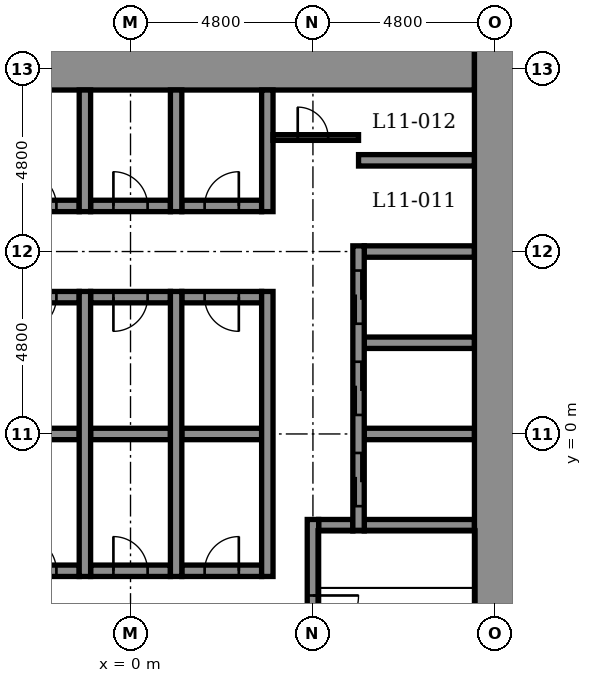
"""IFC4 building model, lengths in metres.
Left out: names, types, materials, properties, quantities, classifications, styles, units other than length and angle.
Written with IfcOpenShell. Run it as: python <this file> out.ifc"""

import sys

from ifc_helpers import new_model, si_unit, direction, frame, frame_2d, origin, place, context, subcontext, project, spatial, rectangle, extrude, element, fill, save


model = new_model("IFC4")
c1 = context("Model", 3, precision=1e-05, world=origin(), true_north=direction((0.0, 1.0)))
c2 = subcontext(c1, "Body", "Model", "MODEL_VIEW")
j1 = project(units=[si_unit("LENGTHUNIT", "METRE"), si_unit("PLANEANGLEUNIT", "RADIAN")], contexts=[c1])
p1 = place(None, origin())
s1 = spatial("IfcSite", under=j1, at=p1, CompositionType="ELEMENT")
p2 = place(p1, origin())
s2 = spatial("IfcBuilding", under=s1, at=p2, CompositionType="ELEMENT")
p3 = place(p2, frame((0.0, 0.0, 60.9)))
s3 = spatial("IfcBuildingStorey", under=s2, at=p3, CompositionType="ELEMENT", Elevation=60.9)
p4 = place(p3, frame((-3.45, -3.6, -0.25), z_axis=(0.0, 0.0, 1.0), x_axis=(1.0, 0.0, 0.0)))
e1 = element("IfcWall", 1, at=p4, inside=s3, PredefinedType="STANDARD", context=c2, shape_type="SweptSolid", body=[
    extrude(rectangle(XDim=2.1, YDim=0.3, at=frame_2d((1.05, 0.0))), origin(), (0.0, 0.0, 1.0), 5.45),
])
p5 = place(p4, frame((0.6, 0.0, 0.25)))
e2 = element("IfcOpeningElement", 2, at=p5, cuts=e1, PredefinedType="OPENING", context=c2, shape_type="SweptSolid", body=[
    extrude(rectangle(XDim=0.9, YDim=2.1, at=frame_2d((0.45, 1.05))), frame((0.0, 0.16, 0.0), z_axis=(0.0, -1.0, 0.0), x_axis=(1.0, 0.0, 0.0)), (0.0, 0.0, 1.0), 0.32),
])
p6 = place(p3, frame((-1.05, -3.6, -0.25), z_axis=(0.0, 0.0, 1.0), x_axis=(1.0, 0.0, 0.0)))
e3 = element("IfcWall", 3, at=p6, inside=s3, PredefinedType="STANDARD", context=c2, shape_type="SweptSolid", body=[
    extrude(rectangle(XDim=2.1, YDim=0.3, at=frame_2d((1.05, 0.0))), origin(), (0.0, 0.0, 1.0), 5.45),
])
p7 = place(p6, frame((0.6, 0.0, 0.25)))
e4 = element("IfcOpeningElement", 4, at=p7, cuts=e3, PredefinedType="OPENING", context=c2, shape_type="SweptSolid", body=[
    extrude(rectangle(XDim=0.9, YDim=2.1, at=frame_2d((0.45, 1.05))), frame((0.0, 0.16, 0.0), z_axis=(0.0, -1.0, 0.0), x_axis=(1.0, 0.0, 0.0)), (0.0, 0.0, 1.0), 0.32),
])
p8 = place(p3, frame((1.35, -3.6, -0.25), z_axis=(0.0, 0.0, 1.0), x_axis=(1.0, 0.0, 0.0)))
e5 = element("IfcWall", 5, at=p8, inside=s3, PredefinedType="STANDARD", context=c2, shape_type="SweptSolid", body=[
    extrude(rectangle(XDim=2.1, YDim=0.3, at=frame_2d((1.05, 0.0))), origin(), (0.0, 0.0, 1.0), 5.45),
])
p9 = place(p8, frame((0.6, 0.0, 0.25)))
e6 = element("IfcOpeningElement", 6, at=p9, cuts=e5, PredefinedType="OPENING", context=c2, shape_type="SweptSolid", body=[
    extrude(rectangle(XDim=0.9, YDim=2.1, at=frame_2d((0.45, 1.05))), frame((0.0, 0.16, 0.0), z_axis=(0.0, -1.0, 0.0), x_axis=(1.0, 0.0, 0.0)), (0.0, 0.0, 1.0), 0.32),
])
p10 = place(p3, frame((4.95, -2.4, -0.25), z_axis=(0.0, 0.0, 1.0), x_axis=(1.0, 0.0, 0.0)))
e7 = element("IfcWall", 7, at=p10, inside=s3, PredefinedType="STANDARD", context=c2, shape_type="SweptSolid", body=[
    extrude(rectangle(XDim=0.9, YDim=0.3, at=frame_2d((0.45, 0.0))), origin(), (0.0, 0.0, 1.0), 5.45),
])
p11 = place(p3, frame((6.15, -2.4, -0.25), z_axis=(0.0, 0.0, 1.0), x_axis=(1.0, 0.0, 0.0)))
e8 = element("IfcWall", 8, at=p11, inside=s3, PredefinedType="STANDARD", context=c2, shape_type="SweptSolid", body=[
    extrude(rectangle(XDim=2.9, YDim=0.3, at=frame_2d((1.45, 0.0))), origin(), (0.0, 0.0, 1.0), 5.45),
])
p12 = place(p3, frame((-3.45, 0.0, -0.25), z_axis=(0.0, 0.0, 1.0), x_axis=(1.0, 0.0, 0.0)))
e9 = element("IfcWall", 9, at=p12, inside=s3, PredefinedType="STANDARD", context=c2, shape_type="SweptSolid", body=[
    extrude(rectangle(XDim=2.1, YDim=0.3, at=frame_2d((1.05, 0.0))), origin(), (0.0, 0.0, 1.0), 5.45),
])
p13 = place(p3, frame((-1.05, 0.0, -0.25), z_axis=(0.0, 0.0, 1.0), x_axis=(1.0, 0.0, 0.0)))
e10 = element("IfcWall", 10, at=p13, inside=s3, PredefinedType="STANDARD", context=c2, shape_type="SweptSolid", body=[
    extrude(rectangle(XDim=2.1, YDim=0.3, at=frame_2d((1.05, 0.0))), origin(), (0.0, 0.0, 1.0), 5.45),
])
p14 = place(p3, frame((1.35, 0.0, -0.25), z_axis=(0.0, 0.0, 1.0), x_axis=(1.0, 0.0, 0.0)))
e11 = element("IfcWall", 11, at=p14, inside=s3, PredefinedType="STANDARD", context=c2, shape_type="SweptSolid", body=[
    extrude(rectangle(XDim=2.1, YDim=0.3, at=frame_2d((1.05, 0.0))), origin(), (0.0, 0.0, 1.0), 5.45),
])
for number, where, z_axis, x_axis in (
    (12, (6.15, 0.0, -0.25), (0.0, 0.0, 1.0), (1.0, 0.0, 0.0)),
    (13, (6.15, 2.4, -0.25), (0.0, 0.0, 1.0), (1.0, 0.0, 0.0)),
):
    element("IfcWall", number, at=place(p3, frame(where, z_axis=z_axis, x_axis=x_axis)), inside=s3, PredefinedType="STANDARD", context=c2, shape_type="SweptSolid", body=[
        extrude(rectangle(XDim=2.9, YDim=0.3, at=frame_2d((1.45, 0.0))), origin(), (0.0, 0.0, 1.0), 5.45),
    ])
p15 = place(p3, frame((-3.45, 3.6, -0.25), z_axis=(0.0, 0.0, 1.0), x_axis=(1.0, 0.0, 0.0)))
e14 = element("IfcWall", 14, at=p15, inside=s3, PredefinedType="STANDARD", context=c2, shape_type="SweptSolid", body=[
    extrude(rectangle(XDim=2.1, YDim=0.3, at=frame_2d((1.05, 0.0))), origin(), (0.0, 0.0, 1.0), 5.45),
])
p16 = place(p15, frame((0.6, 0.0, 0.25)))
e15 = element("IfcOpeningElement", 15, at=p16, cuts=e14, PredefinedType="OPENING", context=c2, shape_type="SweptSolid", body=[
    extrude(rectangle(XDim=0.9, YDim=2.1, at=frame_2d((0.45, 1.05))), frame((0.0, 0.16, 0.0), z_axis=(0.0, -1.0, 0.0), x_axis=(1.0, 0.0, 0.0)), (0.0, 0.0, 1.0), 0.32),
])
p17 = place(p3, frame((-1.05, 3.6, -0.25), z_axis=(0.0, 0.0, 1.0), x_axis=(1.0, 0.0, 0.0)))
e16 = element("IfcWall", 16, at=p17, inside=s3, PredefinedType="STANDARD", context=c2, shape_type="SweptSolid", body=[
    extrude(rectangle(XDim=2.1, YDim=0.3, at=frame_2d((1.05, 0.0))), origin(), (0.0, 0.0, 1.0), 5.45),
])
p18 = place(p17, frame((0.6, 0.0, 0.25)))
e17 = element("IfcOpeningElement", 17, at=p18, cuts=e16, PredefinedType="OPENING", context=c2, shape_type="SweptSolid", body=[
    extrude(rectangle(XDim=0.9, YDim=2.1, at=frame_2d((0.45, 1.05))), frame((0.0, 0.16, 0.0), z_axis=(0.0, -1.0, 0.0), x_axis=(1.0, 0.0, 0.0)), (0.0, 0.0, 1.0), 0.32),
])
p19 = place(p3, frame((1.35, 3.6, -0.25), z_axis=(0.0, 0.0, 1.0), x_axis=(1.0, 0.0, 0.0)))
e18 = element("IfcWall", 18, at=p19, inside=s3, PredefinedType="STANDARD", context=c2, shape_type="SweptSolid", body=[
    extrude(rectangle(XDim=2.1, YDim=0.3, at=frame_2d((1.05, 0.0))), origin(), (0.0, 0.0, 1.0), 5.45),
])
p20 = place(p19, frame((0.6, 0.0, 0.25)))
e19 = element("IfcOpeningElement", 19, at=p20, cuts=e18, PredefinedType="OPENING", context=c2, shape_type="SweptSolid", body=[
    extrude(rectangle(XDim=0.9, YDim=2.1, at=frame_2d((0.45, 1.05))), frame((0.0, 0.16, 0.0), z_axis=(0.0, -1.0, 0.0), x_axis=(1.0, 0.0, 0.0)), (0.0, 0.0, 1.0), 0.32),
])
p21 = place(p3, frame((6.15, 4.8, -0.25), z_axis=(0.0, 0.0, 1.0), x_axis=(1.0, 0.0, 0.0)))
e20 = element("IfcWall", 20, at=p21, inside=s3, PredefinedType="STANDARD", context=c2, shape_type="SweptSolid", body=[
    extrude(rectangle(XDim=2.9, YDim=0.3, at=frame_2d((1.45, 0.0))), origin(), (0.0, 0.0, 1.0), 5.45),
])
p22 = place(p3, frame((-3.45, 6.0, -0.25), z_axis=(0.0, 0.0, 1.0), x_axis=(1.0, 0.0, 0.0)))
e21 = element("IfcWall", 21, at=p22, inside=s3, PredefinedType="STANDARD", context=c2, shape_type="SweptSolid", body=[
    extrude(rectangle(XDim=2.1, YDim=0.3, at=frame_2d((1.05, 0.0))), origin(), (0.0, 0.0, 1.0), 5.45),
])
p23 = place(p22, frame((0.6, 0.0, 0.25)))
e22 = element("IfcOpeningElement", 22, at=p23, cuts=e21, PredefinedType="OPENING", context=c2, shape_type="SweptSolid", body=[
    extrude(rectangle(XDim=0.9, YDim=2.1, at=frame_2d((0.45, 1.05))), frame((0.0, 0.16, 0.0), z_axis=(0.0, -1.0, 0.0), x_axis=(1.0, 0.0, 0.0)), (0.0, 0.0, 1.0), 0.32),
])
p24 = place(p3, frame((-1.05, 6.0, -0.25), z_axis=(0.0, 0.0, 1.0), x_axis=(1.0, 0.0, 0.0)))
e23 = element("IfcWall", 23, at=p24, inside=s3, PredefinedType="STANDARD", context=c2, shape_type="SweptSolid", body=[
    extrude(rectangle(XDim=2.1, YDim=0.3, at=frame_2d((1.05, 0.0))), origin(), (0.0, 0.0, 1.0), 5.45),
])
p25 = place(p24, frame((0.6, 0.0, 0.25)))
e24 = element("IfcOpeningElement", 24, at=p25, cuts=e23, PredefinedType="OPENING", context=c2, shape_type="SweptSolid", body=[
    extrude(rectangle(XDim=0.9, YDim=2.1, at=frame_2d((0.45, 1.05))), frame((0.0, 0.16, 0.0), z_axis=(0.0, -1.0, 0.0), x_axis=(1.0, 0.0, 0.0)), (0.0, 0.0, 1.0), 0.32),
])
p26 = place(p3, frame((1.35, 6.0, -0.25), z_axis=(0.0, 0.0, 1.0), x_axis=(1.0, 0.0, 0.0)))
e25 = element("IfcWall", 25, at=p26, inside=s3, PredefinedType="STANDARD", context=c2, shape_type="SweptSolid", body=[
    extrude(rectangle(XDim=2.1, YDim=0.3, at=frame_2d((1.05, 0.0))), origin(), (0.0, 0.0, 1.0), 5.45),
])
p27 = place(p26, frame((0.6, 0.0, 0.25)))
e26 = element("IfcOpeningElement", 26, at=p27, cuts=e25, PredefinedType="OPENING", context=c2, shape_type="SweptSolid", body=[
    extrude(rectangle(XDim=0.9, YDim=2.1, at=frame_2d((0.45, 1.05))), frame((0.0, 0.16, 0.0), z_axis=(0.0, -1.0, 0.0), x_axis=(1.0, 0.0, 0.0)), (0.0, 0.0, 1.0), 0.32),
])
p28 = place(p3, frame((6.0, 7.2, -0.25), z_axis=(0.0, 0.0, 1.0), x_axis=(1.0, 0.0, 0.0)))
e27 = element("IfcWall", 27, at=p28, inside=s3, PredefinedType="STANDARD", context=c2, shape_type="SweptSolid", body=[
    extrude(rectangle(XDim=3.05, YDim=0.3, at=frame_2d((1.525, 0.0))), origin(), (0.0, 0.0, 1.0), 5.45),
])
p29 = place(p3, frame((-5.25, 9.6, -0.25), z_axis=(0.0, 0.0, 1.0), x_axis=(1.0, 0.0, 0.0)))
e28 = element("IfcWall", 28, at=p29, inside=s3, PredefinedType="SHEAR", context=c2, shape_type="SweptSolid", body=[
    extrude(rectangle(XDim=14.3, YDim=1.1, at=frame_2d((7.15, 0.0))), origin(), (0.0, 0.0, 1.0), 5.45),
])
p30 = place(p29, frame((0.6, 0.0, 0.25)))
e29 = element("IfcOpeningElement", 29, at=p30, cuts=e28, PredefinedType="OPENING", context=c2, shape_type="SweptSolid", body=[
    extrude(rectangle(XDim=0.9, YDim=2.1, at=frame_2d((0.45, 1.05))), frame((0.0, 0.56, 0.0), z_axis=(0.0, -1.0, 0.0), x_axis=(1.0, 0.0, 0.0)), (0.0, 0.0, 1.0), 1.12),
])
p31 = place(p3, frame((-1.2, -3.75, -0.25), z_axis=(0.0, 0.0, 1.0), x_axis=(0.0, 1.0, 0.0)))
e30 = element("IfcWall", 30, at=p31, inside=s3, PredefinedType="STANDARD", context=c2, shape_type="SweptSolid", body=[
    extrude(rectangle(XDim=7.5, YDim=0.3, at=frame_2d((3.75, 0.0))), origin(), (0.0, 0.0, 1.0), 5.45),
])
p32 = place(p3, frame((-1.2, 5.85, -0.25), z_axis=(0.0, 0.0, 1.0), x_axis=(0.0, 1.0, 0.0)))
e31 = element("IfcWall", 31, at=p32, inside=s3, PredefinedType="STANDARD", context=c2, shape_type="SweptSolid", body=[
    extrude(rectangle(XDim=3.2, YDim=0.3, at=frame_2d((1.6, 0.0))), origin(), (0.0, 0.0, 1.0), 5.45),
])
p33 = place(p3, frame((1.2, -3.75, -0.25), z_axis=(0.0, 0.0, 1.0), x_axis=(0.0, 1.0, 0.0)))
e32 = element("IfcWall", 32, at=p33, inside=s3, PredefinedType="STANDARD", context=c2, shape_type="SweptSolid", body=[
    extrude(rectangle(XDim=7.5, YDim=0.3, at=frame_2d((3.75, 0.0))), origin(), (0.0, 0.0, 1.0), 5.45),
])
p34 = place(p3, frame((1.2, 5.85, -0.25), z_axis=(0.0, 0.0, 1.0), x_axis=(0.0, 1.0, 0.0)))
e33 = element("IfcWall", 33, at=p34, inside=s3, PredefinedType="STANDARD", context=c2, shape_type="SweptSolid", body=[
    extrude(rectangle(XDim=3.2, YDim=0.3, at=frame_2d((1.6, 0.0))), origin(), (0.0, 0.0, 1.0), 5.45),
])
p35 = place(p3, frame((3.6, -3.75, -0.25), z_axis=(0.0, 0.0, 1.0), x_axis=(0.0, 1.0, 0.0)))
e34 = element("IfcWall", 34, at=p35, inside=s3, PredefinedType="STANDARD", context=c2, shape_type="SweptSolid", body=[
    extrude(rectangle(XDim=7.5, YDim=0.3, at=frame_2d((3.75, 0.0))), origin(), (0.0, 0.0, 1.0), 5.45),
])
p36 = place(p3, frame((3.6, 5.85, -0.25), z_axis=(0.0, 0.0, 1.0), x_axis=(0.0, 1.0, 0.0)))
e35 = element("IfcWall", 35, at=p36, inside=s3, PredefinedType="STANDARD", context=c2, shape_type="SweptSolid", body=[
    extrude(rectangle(XDim=3.2, YDim=0.3, at=frame_2d((1.6, 0.0))), origin(), (0.0, 0.0, 1.0), 5.45),
])
p37 = place(p3, frame((4.8, -9.05, -0.25), z_axis=(0.0, 0.0, 1.0), x_axis=(0.0, 1.0, 0.0)))
e36 = element("IfcWall", 36, at=p37, inside=s3, PredefinedType="STANDARD", context=c2, shape_type="SweptSolid", body=[
    extrude(rectangle(XDim=6.8, YDim=0.3, at=frame_2d((3.4, 0.0))), origin(), (0.0, 0.0, 1.0), 5.45),
])
p38 = place(p37, frame((3.6, 0.0, 0.25)))
e37 = element("IfcOpeningElement", 37, at=p38, cuts=e36, PredefinedType="OPENING", context=c2, shape_type="SweptSolid", body=[
    extrude(rectangle(XDim=1.2, YDim=2.1, at=frame_2d((0.6, 1.05))), frame((0.0, 0.16, 0.0), z_axis=(0.0, -1.0, 0.0), x_axis=(1.0, 0.0, 0.0)), (0.0, 0.0, 1.0), 0.32),
])
p39 = place(p3, frame((6.0, -2.55, -0.25), z_axis=(0.0, 0.0, 1.0), x_axis=(0.0, 1.0, 0.0)))
e38 = element("IfcWall", 38, at=p39, inside=s3, PredefinedType="STANDARD", context=c2, shape_type="SweptSolid", body=[
    extrude(rectangle(XDim=7.5, YDim=0.3, at=frame_2d((3.75, 0.0))), origin(), (0.0, 0.0, 1.0), 5.45),
])
p40 = place(p39, frame((0.65, 0.0, 0.25)))
e39 = element("IfcOpeningElement", 39, at=p40, cuts=e38, PredefinedType="OPENING", context=c2, shape_type="SweptSolid", body=[
    extrude(rectangle(XDim=1.4, YDim=2.1, at=frame_2d((0.7, 1.05))), frame((0.0, 0.16, 0.0), z_axis=(0.0, -1.0, 0.0), x_axis=(1.0, 0.0, 0.0)), (0.0, 0.0, 1.0), 0.32),
])
p41 = place(p39, frame((3.05, 0.0, 0.25)))
e40 = element("IfcOpeningElement", 40, at=p41, cuts=e38, PredefinedType="OPENING", context=c2, shape_type="SweptSolid", body=[
    extrude(rectangle(XDim=1.4, YDim=2.1, at=frame_2d((0.7, 1.05))), frame((0.0, 0.16, 0.0), z_axis=(0.0, -1.0, 0.0), x_axis=(1.0, 0.0, 0.0)), (0.0, 0.0, 1.0), 0.32),
])
p42 = place(p39, frame((5.45, 0.0, 0.25)))
e41 = element("IfcOpeningElement", 41, at=p42, cuts=e38, PredefinedType="OPENING", context=c2, shape_type="SweptSolid", body=[
    extrude(rectangle(XDim=1.4, YDim=2.1, at=frame_2d((0.7, 1.05))), frame((0.0, 0.16, 0.0), z_axis=(0.0, -1.0, 0.0), x_axis=(1.0, 0.0, 0.0)), (0.0, 0.0, 1.0), 0.32),
])
p43 = place(p3, frame((9.6, -10.15, -0.25), z_axis=(0.0, 0.0, 1.0), x_axis=(0.0, 1.0, 0.0)))
e42 = element("IfcWall", 42, at=p43, inside=s3, PredefinedType="SHEAR", context=c2, shape_type="SweptSolid", body=[
    extrude(rectangle(XDim=20.3, YDim=1.1, at=frame_2d((10.15, 0.0))), origin(), (0.0, 0.0, 1.0), 5.45),
])
p44 = place(p3, frame((3.75, 7.8, 0.0), z_axis=(0.0, 0.0, 1.0), x_axis=(1.0, 0.0, 0.0)))
e43 = element("IfcWall", 43, at=p44, inside=s3, PredefinedType="PARTITIONING", context=c2, shape_type="SweptSolid", body=[
    extrude(rectangle(XDim=2.25, YDim=0.15, at=frame_2d((1.125, 0.0))), origin(), (0.0, 0.0, 1.0), 5.2),
])
p45 = place(p44, frame((0.65, 0.0, 0.0)))
e44 = element("IfcOpeningElement", 44, at=p45, cuts=e43, PredefinedType="OPENING", context=c2, shape_type="SweptSolid", body=[
    extrude(rectangle(XDim=0.8, YDim=2.1, at=frame_2d((0.4, 1.05))), frame((0.0, 0.085, 0.0), z_axis=(0.0, -1.0, 0.0), x_axis=(1.0, 0.0, 0.0)), (0.0, 0.0, 1.0), 0.17),
])
p46 = place(p45, origin())
e45 = element("IfcDoor", 45, at=p46, inside=s3, OperationType="SINGLE_SWING_LEFT", PredefinedType="DOOR", context=c2, shape_type="SweptSolid", body=[
    extrude(rectangle(XDim=0.8, YDim=2.1, at=frame_2d((0.4, 1.05))), frame((0.0, 0.025, 0.0), z_axis=(0.0, -1.0, 0.0), x_axis=(1.0, 0.0, 0.0)), (0.0, 0.0, 1.0), 0.05),
])
fill(e44, e45)
p47 = place(p40, origin())
e46 = element("IfcDoor", 46, at=p47, inside=s3, OperationType="DOUBLE_DOOR_SLIDING", PredefinedType="DOOR", context=c2, shape_type="SweptSolid", body=[
    extrude(rectangle(XDim=1.4, YDim=2.1, at=frame_2d((0.7, 1.05))), frame((0.0, 0.025, 0.0), z_axis=(0.0, -1.0, 0.0), x_axis=(1.0, 0.0, 0.0)), (0.0, 0.0, 1.0), 0.05),
])
fill(e39, e46)
p48 = place(p41, origin())
e47 = element("IfcDoor", 47, at=p48, inside=s3, OperationType="DOUBLE_DOOR_SLIDING", PredefinedType="DOOR", context=c2, shape_type="SweptSolid", body=[
    extrude(rectangle(XDim=1.4, YDim=2.1, at=frame_2d((0.7, 1.05))), frame((0.0, 0.025, 0.0), z_axis=(0.0, -1.0, 0.0), x_axis=(1.0, 0.0, 0.0)), (0.0, 0.0, 1.0), 0.05),
])
fill(e40, e47)
p49 = place(p42, origin())
e48 = element("IfcDoor", 48, at=p49, inside=s3, OperationType="DOUBLE_DOOR_SLIDING", PredefinedType="DOOR", context=c2, shape_type="SweptSolid", body=[
    extrude(rectangle(XDim=1.4, YDim=2.1, at=frame_2d((0.7, 1.05))), frame((0.0, 0.025, 0.0), z_axis=(0.0, -1.0, 0.0), x_axis=(1.0, 0.0, 0.0)), (0.0, 0.0, 1.0), 0.05),
])
fill(e41, e48)
p50 = place(p38, frame((1.2, 0.0, 0.0), z_axis=(0.0, 0.0, 1.0), x_axis=(-1.0, 0.0, 0.0)))
e49 = element("IfcDoor", 49, at=p50, inside=s3, OperationType="SINGLE_SWING_RIGHT", PredefinedType="DOOR", context=c2, shape_type="SweptSolid", body=[
    extrude(rectangle(XDim=1.2, YDim=2.1, at=frame_2d((0.6, 1.05))), frame((0.0, 0.025, 0.0), z_axis=(0.0, -1.0, 0.0), x_axis=(1.0, 0.0, 0.0)), (0.0, 0.0, 1.0), 0.05),
])
fill(e37, e49)
p51 = place(p23, origin())
e50 = element("IfcDoor", 50, at=p51, inside=s3, OperationType="SINGLE_SWING_LEFT", PredefinedType="DOOR", context=c2, shape_type="SweptSolid", body=[
    extrude(rectangle(XDim=0.9, YDim=2.1, at=frame_2d((0.45, 1.05))), frame((0.0, 0.025, 0.0), z_axis=(0.0, -1.0, 0.0), x_axis=(1.0, 0.0, 0.0)), (0.0, 0.0, 1.0), 0.05),
])
fill(e22, e50)
p52 = place(p25, origin())
e51 = element("IfcDoor", 51, at=p52, inside=s3, OperationType="SINGLE_SWING_LEFT", PredefinedType="DOOR", context=c2, shape_type="SweptSolid", body=[
    extrude(rectangle(XDim=0.9, YDim=2.1, at=frame_2d((0.45, 1.05))), frame((0.0, 0.025, 0.0), z_axis=(0.0, -1.0, 0.0), x_axis=(1.0, 0.0, 0.0)), (0.0, 0.0, 1.0), 0.05),
])
fill(e24, e51)
p53 = place(p27, origin())
e52 = element("IfcDoor", 52, at=p53, inside=s3, OperationType="SINGLE_SWING_RIGHT", PredefinedType="DOOR", context=c2, shape_type="SweptSolid", body=[
    extrude(rectangle(XDim=0.9, YDim=2.1, at=frame_2d((0.45, 1.05))), frame((0.0, 0.025, 0.0), z_axis=(0.0, -1.0, 0.0), x_axis=(1.0, 0.0, 0.0)), (0.0, 0.0, 1.0), 0.05),
])
fill(e26, e52)
p54 = place(p16, frame((0.9, 0.0, 0.0), z_axis=(0.0, 0.0, 1.0), x_axis=(-1.0, 0.0, 0.0)))
e53 = element("IfcDoor", 53, at=p54, inside=s3, OperationType="SINGLE_SWING_LEFT", PredefinedType="DOOR", context=c2, shape_type="SweptSolid", body=[
    extrude(rectangle(XDim=0.9, YDim=2.1, at=frame_2d((0.45, 1.05))), frame((0.0, 0.025, 0.0), z_axis=(0.0, -1.0, 0.0), x_axis=(1.0, 0.0, 0.0)), (0.0, 0.0, 1.0), 0.05),
])
fill(e15, e53)
p55 = place(p18, frame((0.9, 0.0, 0.0), z_axis=(0.0, 0.0, 1.0), x_axis=(-1.0, 0.0, 0.0)))
e54 = element("IfcDoor", 54, at=p55, inside=s3, OperationType="SINGLE_SWING_LEFT", PredefinedType="DOOR", context=c2, shape_type="SweptSolid", body=[
    extrude(rectangle(XDim=0.9, YDim=2.1, at=frame_2d((0.45, 1.05))), frame((0.0, 0.025, 0.0), z_axis=(0.0, -1.0, 0.0), x_axis=(1.0, 0.0, 0.0)), (0.0, 0.0, 1.0), 0.05),
])
fill(e17, e54)
p56 = place(p20, frame((0.9, 0.0, 0.0), z_axis=(0.0, 0.0, 1.0), x_axis=(-1.0, 0.0, 0.0)))
e55 = element("IfcDoor", 55, at=p56, inside=s3, OperationType="SINGLE_SWING_RIGHT", PredefinedType="DOOR", context=c2, shape_type="SweptSolid", body=[
    extrude(rectangle(XDim=0.9, YDim=2.1, at=frame_2d((0.45, 1.05))), frame((0.0, 0.025, 0.0), z_axis=(0.0, -1.0, 0.0), x_axis=(1.0, 0.0, 0.0)), (0.0, 0.0, 1.0), 0.05),
])
fill(e19, e55)
p57 = place(p5, origin())
e56 = element("IfcDoor", 56, at=p57, inside=s3, OperationType="SINGLE_SWING_LEFT", PredefinedType="DOOR", context=c2, shape_type="SweptSolid", body=[
    extrude(rectangle(XDim=0.9, YDim=2.1, at=frame_2d((0.45, 1.05))), frame((0.0, 0.025, 0.0), z_axis=(0.0, -1.0, 0.0), x_axis=(1.0, 0.0, 0.0)), (0.0, 0.0, 1.0), 0.05),
])
fill(e2, e56)
p58 = place(p7, origin())
e57 = element("IfcDoor", 57, at=p58, inside=s3, OperationType="SINGLE_SWING_LEFT", PredefinedType="DOOR", context=c2, shape_type="SweptSolid", body=[
    extrude(rectangle(XDim=0.9, YDim=2.1, at=frame_2d((0.45, 1.05))), frame((0.0, 0.025, 0.0), z_axis=(0.0, -1.0, 0.0), x_axis=(1.0, 0.0, 0.0)), (0.0, 0.0, 1.0), 0.05),
])
fill(e4, e57)
p59 = place(p9, origin())
e58 = element("IfcDoor", 58, at=p59, inside=s3, OperationType="SINGLE_SWING_RIGHT", PredefinedType="DOOR", context=c2, shape_type="SweptSolid", body=[
    extrude(rectangle(XDim=0.9, YDim=2.1, at=frame_2d((0.45, 1.05))), frame((0.0, 0.025, 0.0), z_axis=(0.0, -1.0, 0.0), x_axis=(1.0, 0.0, 0.0)), (0.0, 0.0, 1.0), 0.05),
])
fill(e6, e58)
save(model, sys.argv[1])
